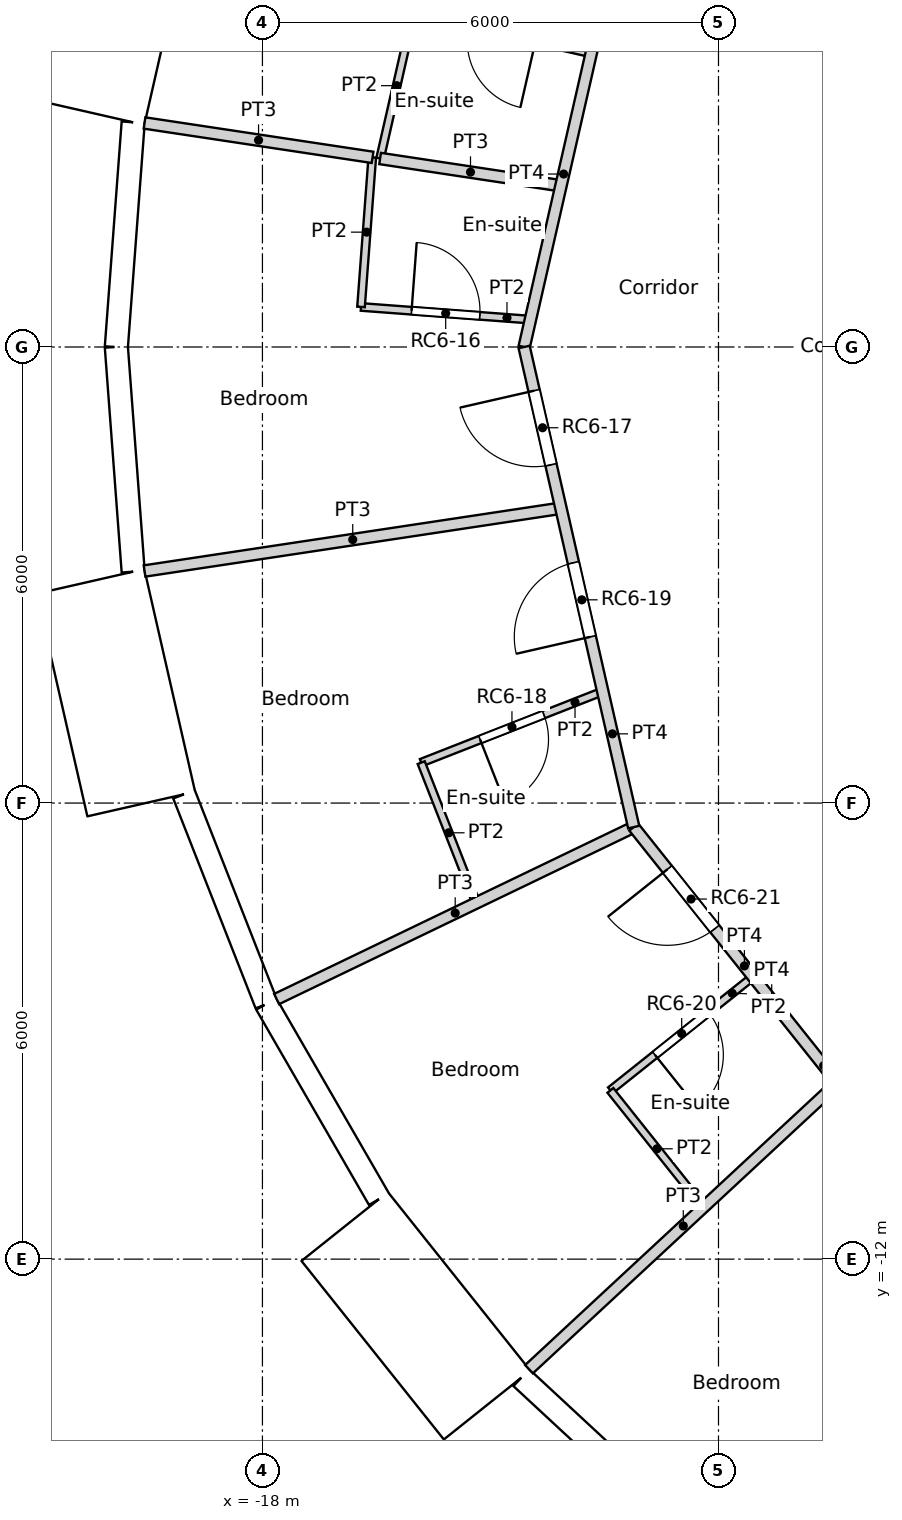
"""IFC4 building model, lengths in metres.
Left out: names, types, materials, properties, quantities, classifications, styles, units other than length and angle.
Written with IfcOpenShell. Run it as: python <this file> out.ifc"""

import sys

from ifc_helpers import new_model, si_unit, direction, frame, frame_2d, origin, origin_2d, place, context, subcontext, project, spatial, rectangle, circle, extrude, element, fill, save


model = new_model("IFC4")
c1 = context("Model", 3, precision=1e-05, world=origin(), true_north=direction((0.0, 1.0)))
c2 = subcontext(c1, "Body", "Model", "MODEL_VIEW")
j1 = project(units=[si_unit("LENGTHUNIT", "METRE"), si_unit("PLANEANGLEUNIT", "RADIAN")], contexts=[c1])
p1 = place(None, origin())
s1 = spatial("IfcSite", under=j1, at=p1, CompositionType="ELEMENT")
p2 = place(p1, origin())
s2 = spatial("IfcBuilding", under=s1, at=p2, CompositionType="ELEMENT")
p3 = place(p2, frame((0.0, 0.0, 283.8)))
s3 = spatial("IfcBuildingStorey", under=s2, at=p3, CompositionType="ELEMENT", Elevation=283.8)
for number, where, z_axis, x_axis in (
    (1, (-18.612, 2.805, 0.0), (0.0, 0.0, 1.0), (1.0, 0.0, 0.0)),
    (2, (-18.612, -2.805, 0.0), (0.0, 0.0, 1.0), (1.0, 0.0, 0.0)),
    (3, (-16.958, -8.167, 0.0), (0.0, 0.0, 1.0), (1.0, 0.0, 0.0)),
    (4, (-13.798, -12.802, 0.0), (0.0, 0.0, 1.0), (1.0, 0.0, 0.0)),
):
    element("IfcColumn", number, at=place(p3, frame(where, z_axis=z_axis, x_axis=x_axis)), inside=s3, PredefinedType="COLUMN", context=c2, shape_type="SweptSolid", body=[
        extrude(circle(Radius=0.45, at=origin_2d()), origin(), (0.0, 0.0, 1.0), 3.6),
    ])
p4 = place(p3, frame((-19.595, 6.011, -0.35), z_axis=(0.0, 0.0, 1.0), x_axis=(-0.222570682856, -0.974916555985, 0.0)))
e5 = element("IfcWall", 5, at=p4, inside=s3, PredefinedType="ELEMENTEDWALL", context=c2, shape_type="SweptSolid", body=[
    extrude(rectangle(XDim=3.0, YDim=1.45, at=frame_2d((1.5, 0.0))), origin(), (0.0, 0.0, 1.0), 3.6),
])
p5 = place(p4, frame((1.5, 0.0, 1.9)))
e6 = element("IfcOpeningElement", 6, at=p5, cuts=e5, PredefinedType="OPENING", context=c2, shape_type="SweptSolid", body=[
    extrude(circle(Radius=0.9, at=origin_2d()), frame((0.0, 0.735, 0.0), z_axis=(0.0, -1.0, 0.0), x_axis=(1.0, 0.0, 0.0)), (0.0, 0.0, 1.0), 1.47),
])
p6 = place(p3, frame((-19.7, 2.954, 0.0), z_axis=(0.0, 0.0, 1.0), x_axis=(-0.074755115547, -0.997201921729, 0.0)))
e7 = element("IfcWall", 7, at=p6, inside=s3, PredefinedType="SOLIDWALL", context=c2, shape_type="SweptSolid", body=[
    extrude(rectangle(XDim=2.962, YDim=0.3, at=frame_2d((1.481, 0.0))), origin(), (0.0, 0.0, 1.0), 3.25),
])
p7 = place(p6, frame((1.481, 0.0, 1.55)))
e8 = element("IfcOpeningElement", 8, at=p7, cuts=e7, PredefinedType="OPENING", context=c2, shape_type="SweptSolid", body=[
    extrude(circle(Radius=0.9, at=origin_2d()), frame((0.0, 0.16, 0.0), z_axis=(0.0, -1.0, 0.0), x_axis=(1.0, 0.0, 0.0)), (0.0, 0.0, 1.0), 0.32),
])
p8 = place(p3, frame((-19.922, 0.0, 0.0), z_axis=(0.0, 0.0, 1.0), x_axis=(0.074755115547, -0.997201921729, 0.0)))
e9 = element("IfcWall", 9, at=p8, inside=s3, PredefinedType="SOLIDWALL", context=c2, shape_type="SweptSolid", body=[
    extrude(rectangle(XDim=2.962, YDim=0.3, at=frame_2d((1.481, 0.0))), origin(), (0.0, 0.0, 1.0), 3.25),
])
p9 = place(p8, frame((1.481, 0.0, 1.55)))
e10 = element("IfcOpeningElement", 10, at=p9, cuts=e9, PredefinedType="OPENING", context=c2, shape_type="SweptSolid", body=[
    extrude(circle(Radius=0.9, at=origin_2d()), frame((0.0, 0.16, 0.0), z_axis=(0.0, -1.0, 0.0), x_axis=(1.0, 0.0, 0.0)), (0.0, 0.0, 1.0), 0.32),
])
p10 = place(p3, frame((-20.262, -3.086, -0.35), z_axis=(0.0, 0.0, 1.0), x_axis=(0.222570682856, -0.974916555985, 0.0)))
e11 = element("IfcWall", 11, at=p10, inside=s3, PredefinedType="ELEMENTEDWALL", context=c2, shape_type="SweptSolid", body=[
    extrude(rectangle(XDim=3.0, YDim=1.45, at=frame_2d((1.5, 0.0))), origin(), (0.0, 0.0, 1.0), 3.6),
])
p11 = place(p10, frame((1.5, 0.0, 1.9)))
e12 = element("IfcOpeningElement", 12, at=p11, cuts=e11, PredefinedType="OPENING", context=c2, shape_type="SweptSolid", body=[
    extrude(circle(Radius=0.9, at=origin_2d()), frame((0.0, 0.735, 0.0), z_axis=(0.0, -1.0, 0.0), x_axis=(1.0, 0.0, 0.0)), (0.0, 0.0, 1.0), 1.47),
])
p12 = place(p3, frame((-19.031, -5.886, 0.0), z_axis=(0.0, 0.0, 1.0), x_axis=(0.365343821297, -0.930872650925, 0.0)))
e13 = element("IfcWall", 13, at=p12, inside=s3, PredefinedType="SOLIDWALL", context=c2, shape_type="SweptSolid", body=[
    extrude(rectangle(XDim=2.962, YDim=0.3, at=frame_2d((1.481, 0.0))), origin(), (0.0, 0.0, 1.0), 3.25),
])
p13 = place(p12, frame((1.481, 0.0, 1.55)))
e14 = element("IfcOpeningElement", 14, at=p13, cuts=e13, PredefinedType="OPENING", context=c2, shape_type="SweptSolid", body=[
    extrude(circle(Radius=0.9, at=origin_2d()), frame((0.0, 0.16, 0.0), z_axis=(0.0, -1.0, 0.0), x_axis=(1.0, 0.0, 0.0)), (0.0, 0.0, 1.0), 0.32),
])
p14 = place(p3, frame((-17.949, -8.644, 0.0), z_axis=(0.0, 0.0, 1.0), x_axis=(0.500012570604, -0.866018146021, 0.0)))
e15 = element("IfcWall", 15, at=p14, inside=s3, PredefinedType="SOLIDWALL", context=c2, shape_type="SweptSolid", body=[
    extrude(rectangle(XDim=2.962, YDim=0.3, at=frame_2d((1.481, 0.0))), origin(), (0.0, 0.0, 1.0), 3.25),
])
p15 = place(p14, frame((1.481, 0.0, 1.55)))
e16 = element("IfcOpeningElement", 16, at=p15, cuts=e15, PredefinedType="OPENING", context=c2, shape_type="SweptSolid", body=[
    extrude(circle(Radius=0.9, at=origin_2d()), frame((0.0, 0.16, 0.0), z_axis=(0.0, -1.0, 0.0), x_axis=(1.0, 0.0, 0.0)), (0.0, 0.0, 1.0), 0.32),
])
p16 = place(p3, frame((-16.917, -11.572, -0.35), z_axis=(0.0, 0.0, 1.0), x_axis=(0.623523286312, -0.781804778335, 0.0)))
e17 = element("IfcWall", 17, at=p16, inside=s3, PredefinedType="ELEMENTEDWALL", context=c2, shape_type="SweptSolid", body=[
    extrude(rectangle(XDim=3.0, YDim=1.45, at=frame_2d((1.5, 0.0))), origin(), (0.0, 0.0, 1.0), 3.6),
])
p17 = place(p16, frame((1.5, 0.0, 1.9)))
e18 = element("IfcOpeningElement", 18, at=p17, cuts=e17, PredefinedType="OPENING", context=c2, shape_type="SweptSolid", body=[
    extrude(circle(Radius=0.9, at=origin_2d()), frame((0.0, 0.735, 0.0), z_axis=(0.0, -1.0, 0.0), x_axis=(1.0, 0.0, 0.0)), (0.0, 0.0, 1.0), 1.47),
])
p18 = place(p3, frame((-14.593, -13.561, 0.0), z_axis=(0.0, 0.0, 1.0), x_axis=(0.733028283666, -0.680198158882, 0.0)))
e19 = element("IfcWall", 19, at=p18, inside=s3, PredefinedType="SOLIDWALL", context=c2, shape_type="SweptSolid", body=[
    extrude(rectangle(XDim=2.962, YDim=0.3, at=frame_2d((1.481, 0.0))), origin(), (0.0, 0.0, 1.0), 3.25),
])
p19 = place(p18, frame((1.481, 0.0, 1.55)))
e20 = element("IfcOpeningElement", 20, at=p19, cuts=e19, PredefinedType="OPENING", context=c2, shape_type="SweptSolid", body=[
    extrude(circle(Radius=0.9, at=origin_2d()), frame((0.0, 0.16, 0.0), z_axis=(0.0, -1.0, 0.0), x_axis=(1.0, 0.0, 0.0)), (0.0, 0.0, 1.0), 0.32),
])
p20 = place(p3, frame((-11.3, -8.596, 0.0), z_axis=(0.0, 0.0, 1.0), x_axis=(0.623390921228, -0.781910326911, 0.0)))
e21 = element("IfcWall", 21, at=p20, inside=s3, PredefinedType="PARTITIONING", context=c2, shape_type="SweptSolid", body=[
    extrude(rectangle(XDim=3.564, YDim=0.15, at=frame_2d((1.782, 0.0))), origin(), (0.0, 0.0, 1.0), 3.25),
])
p21 = place(p20, frame((2.244, 0.0, 0.0)))
e22 = element("IfcOpeningElement", 22, at=p21, cuts=e21, PredefinedType="OPENING", context=c2, shape_type="SweptSolid", body=[
    extrude(rectangle(XDim=1.0, YDim=2.1, at=frame_2d((0.5, 1.05))), frame((0.0, 0.075, 0.0), z_axis=(0.0, -1.0, 0.0), x_axis=(1.0, 0.0, 0.0)), (0.0, 0.0, 1.0), 0.15),
])
p22 = place(p3, frame((-11.3, -8.596, 0.0), z_axis=(0.0, 0.0, 1.0), x_axis=(0.0, 1.0, 0.0)))
e23 = element("IfcWall", 23, at=p22, inside=s3, PredefinedType="PARTITIONING", context=c2, shape_type="SweptSolid", body=[
    extrude(rectangle(XDim=0.009, YDim=0.15, at=frame_2d((0.005, 0.0))), origin(), (0.0, 0.0, 1.0), 3.25),
])
p23 = place(p3, frame((-14.557, 0.0, 0.0), z_axis=(0.0, 0.0, 1.0), x_axis=(0.222533159771, 0.974925121639, 0.0)))
e24 = element("IfcWall", 24, at=p23, inside=s3, PredefinedType="PARTITIONING", context=c2, shape_type="SweptSolid", body=[
    extrude(rectangle(XDim=6.478, YDim=0.15, at=frame_2d((3.239, 0.0))), origin(), (0.0, 0.0, 1.0), 3.25),
])
p24 = place(p23, frame((4.718, 0.0, 0.0)))
e25 = element("IfcOpeningElement", 25, at=p24, cuts=e24, PredefinedType="OPENING", context=c2, shape_type="SweptSolid", body=[
    extrude(rectangle(XDim=1.0, YDim=2.1, at=frame_2d((0.5, 1.05))), frame((0.0, 0.075, 0.0), z_axis=(0.0, -1.0, 0.0), x_axis=(1.0, 0.0, 0.0)), (0.0, 0.0, 1.0), 0.15),
])
p25 = place(p3, frame((-14.557, 0.0, 0.0), z_axis=(0.0, 0.0, 1.0), x_axis=(0.222489165471, -0.974935162587, 0.0)))
e26 = element("IfcWall", 26, at=p25, inside=s3, PredefinedType="PARTITIONING", context=c2, shape_type="SweptSolid", body=[
    extrude(rectangle(XDim=6.479, YDim=0.15, at=frame_2d((3.239, 0.0))), origin(), (0.0, 0.0, 1.0), 3.25),
])
p26 = place(p25, frame((0.59, 0.0, 0.0)))
e27 = element("IfcOpeningElement", 27, at=p26, cuts=e26, PredefinedType="OPENING", context=c2, shape_type="SweptSolid", body=[
    extrude(rectangle(XDim=1.0, YDim=2.1, at=frame_2d((0.5, 1.05))), frame((0.0, 0.075, 0.0), z_axis=(0.0, -1.0, 0.0), x_axis=(1.0, 0.0, 0.0)), (0.0, 0.0, 1.0), 0.15),
])
p27 = place(p25, frame((2.912, 0.0, 0.0)))
e28 = element("IfcOpeningElement", 28, at=p27, cuts=e26, PredefinedType="OPENING", context=c2, shape_type="SweptSolid", body=[
    extrude(rectangle(XDim=1.0, YDim=2.1, at=frame_2d((0.5, 1.05))), frame((0.0, 0.075, 0.0), z_axis=(0.0, -1.0, 0.0), x_axis=(1.0, 0.0, 0.0)), (0.0, 0.0, 1.0), 0.15),
])
p28 = place(p3, frame((-13.115, -6.316, 0.0), z_axis=(0.0, 0.0, 1.0), x_axis=(0.623303083673, -0.781980348784, 0.0)))
e29 = element("IfcWall", 29, at=p28, inside=s3, PredefinedType="PARTITIONING", context=c2, shape_type="SweptSolid", body=[
    extrude(rectangle(XDim=2.911, YDim=0.15, at=frame_2d((1.456, 0.0))), origin(), (0.0, 0.0, 1.0), 3.25),
])
p29 = place(p28, frame((0.71, 0.0, 0.0)))
e30 = element("IfcOpeningElement", 30, at=p29, cuts=e29, PredefinedType="OPENING", context=c2, shape_type="SweptSolid", body=[
    extrude(rectangle(XDim=1.0, YDim=2.1, at=frame_2d((0.5, 1.05))), frame((0.0, 0.075, 0.0), z_axis=(0.0, -1.0, 0.0), x_axis=(1.0, 0.0, 0.0)), (0.0, 0.0, 1.0), 0.15),
])
p30 = place(p3, frame((-16.015, 4.396, 0.0), z_axis=(0.0, 0.0, 1.0), x_axis=(0.97493862442, -0.222473995368, 0.0)))
e31 = element("IfcWall", 31, at=p30, inside=s3, PredefinedType="PARTITIONING", context=c2, shape_type="SweptSolid", body=[
    extrude(rectangle(XDim=2.4, YDim=0.1, at=frame_2d((1.2, 0.0))), origin(), (0.0, 0.0, 1.0), 3.25),
])
p31 = place(p30, frame((0.75, 0.0, 0.0)))
e32 = element("IfcOpeningElement", 32, at=p31, cuts=e31, PredefinedType="OPENING", context=c2, shape_type="SweptSolid", body=[
    extrude(rectangle(XDim=0.9, YDim=2.04, at=frame_2d((0.45, 1.02))), frame((0.0, 0.05, 0.0), z_axis=(0.0, -1.0, 0.0), x_axis=(1.0, 0.0, 0.0)), (0.0, 0.0, 1.0), 0.1),
])
p32 = place(p3, frame((-16.452, 2.48, 0.0), z_axis=(0.0, 0.0, 1.0), x_axis=(0.22237276708, 0.974961718459, 0.0)))
e33 = element("IfcWall", 33, at=p32, inside=s3, PredefinedType="PARTITIONING", context=c2, shape_type="SweptSolid", body=[
    extrude(rectangle(XDim=1.965, YDim=0.1, at=frame_2d((0.983, 0.0))), origin(), (0.0, 0.0, 1.0), 3.25),
])
p33 = place(p3, frame((-19.551, 2.947, 0.0), z_axis=(0.0, 0.0, 1.0), x_axis=(0.988844081525, -0.14895429646, 0.0)))
e34 = element("IfcWall", 34, at=p33, inside=s3, PredefinedType="PARTITIONING", context=c2, shape_type="SweptSolid", body=[
    extrude(rectangle(XDim=3.034, YDim=0.15, at=frame_2d((1.517, 0.0))), origin(), (0.0, 0.0, 1.0), 3.25),
])
p34 = place(p3, frame((-16.452, 2.48, 0.0), z_axis=(0.0, 0.0, 1.0), x_axis=(0.988810951618, -0.149174065977, 0.0)))
e35 = element("IfcWall", 35, at=p34, inside=s3, PredefinedType="PARTITIONING", context=c2, shape_type="SweptSolid", body=[
    extrude(rectangle(XDim=2.406, YDim=0.15, at=frame_2d((1.203, 0.0))), origin(), (0.0, 0.0, 1.0), 3.25),
])
p35 = place(p3, frame((-16.703, 0.527, 0.0), z_axis=(0.0, 0.0, 1.0), x_axis=(0.07496524071, 0.99718614746, 0.0)))
e36 = element("IfcWall", 36, at=p35, inside=s3, PredefinedType="PARTITIONING", context=c2, shape_type="SweptSolid", body=[
    extrude(rectangle(XDim=1.974, YDim=0.1, at=frame_2d((0.987, 0.0))), origin(), (0.0, 0.0, 1.0), 3.25),
])
p36 = place(p3, frame((-16.703, 0.527, 0.0), z_axis=(0.0, 0.0, 1.0), x_axis=(0.997202365433, -0.074749196488, 0.0)))
e37 = element("IfcWall", 37, at=p36, inside=s3, PredefinedType="PARTITIONING", context=c2, shape_type="SweptSolid", body=[
    extrude(rectangle(XDim=2.234, YDim=0.1, at=frame_2d((1.117, 0.0))), origin(), (0.0, 0.0, 1.0), 3.25),
])
p37 = place(p36, frame((0.667, 0.0, 0.0)))
e38 = element("IfcOpeningElement", 38, at=p37, cuts=e37, PredefinedType="OPENING", context=c2, shape_type="SweptSolid", body=[
    extrude(rectangle(XDim=0.9, YDim=2.04, at=frame_2d((0.45, 1.02))), frame((0.0, 0.05, 0.0), z_axis=(0.0, -1.0, 0.0), x_axis=(1.0, 0.0, 0.0)), (0.0, 0.0, 1.0), 0.1),
])
p38 = place(p3, frame((-19.551, -2.947, 0.0), z_axis=(0.0, 0.0, 1.0), x_axis=(0.988824228734, 0.149086031099, 0.0)))
e39 = element("IfcWall", 39, at=p38, inside=s3, PredefinedType="PARTITIONING", context=c2, shape_type="SweptSolid", body=[
    extrude(rectangle(XDim=5.54, YDim=0.15, at=frame_2d((2.77, 0.0))), origin(), (0.0, 0.0, 1.0), 3.25),
])
p39 = place(p3, frame((-15.911, -5.468, 0.0), z_axis=(0.0, 0.0, 1.0), x_axis=(0.930898333543, 0.365278376867, 0.0)))
e40 = element("IfcWall", 40, at=p39, inside=s3, PredefinedType="PARTITIONING", context=c2, shape_type="SweptSolid", body=[
    extrude(rectangle(XDim=2.565, YDim=0.1, at=frame_2d((1.283, 0.0))), origin(), (0.0, 0.0, 1.0), 3.25),
])
p40 = place(p39, frame((0.832, 0.0, 0.0)))
e41 = element("IfcOpeningElement", 41, at=p40, cuts=e40, PredefinedType="OPENING", context=c2, shape_type="SweptSolid", body=[
    extrude(rectangle(XDim=0.9, YDim=2.04, at=frame_2d((0.45, 1.02))), frame((0.0, 0.05, 0.0), z_axis=(0.0, -1.0, 0.0), x_axis=(1.0, 0.0, 0.0)), (0.0, 0.0, 1.0), 0.1),
])
p41 = place(p3, frame((-15.911, -5.468, 0.0), z_axis=(0.0, 0.0, 1.0), x_axis=(0.36507706633, -0.930977301356, 0.0)))
e42 = element("IfcWall", 42, at=p41, inside=s3, PredefinedType="PARTITIONING", context=c2, shape_type="SweptSolid", body=[
    extrude(rectangle(XDim=1.983, YDim=0.1, at=frame_2d((0.991, 0.0))), origin(), (0.0, 0.0, 1.0), 3.25),
])
p42 = place(p3, frame((-17.813, -8.578, 0.0), z_axis=(0.0, 0.0, 1.0), x_axis=(0.901049790108, 0.433715662325, 0.0)))
e43 = element("IfcWall", 43, at=p42, inside=s3, PredefinedType="PARTITIONING", context=c2, shape_type="SweptSolid", body=[
    extrude(rectangle(XDim=5.214, YDim=0.15, at=frame_2d((2.607, 0.0))), origin(), (0.0, 0.0, 1.0), 3.25),
])
p43 = place(p3, frame((-13.422, -9.78, 0.0), z_axis=(0.0, 0.0, 1.0), x_axis=(0.781860394524, 0.623453545562, 0.0)))
e44 = element("IfcWall", 44, at=p43, inside=s3, PredefinedType="PARTITIONING", context=c2, shape_type="SweptSolid", body=[
    extrude(rectangle(XDim=2.4, YDim=0.1, at=frame_2d((1.2, 0.0))), origin(), (0.0, 0.0, 1.0), 3.25),
])
p44 = place(p43, frame((0.75, 0.0, 0.0)))
e45 = element("IfcOpeningElement", 45, at=p44, cuts=e44, PredefinedType="OPENING", context=c2, shape_type="SweptSolid", body=[
    extrude(rectangle(XDim=0.9, YDim=2.04, at=frame_2d((0.45, 1.02))), frame((0.0, 0.05, 0.0), z_axis=(0.0, -1.0, 0.0), x_axis=(1.0, 0.0, 0.0)), (0.0, 0.0, 1.0), 0.1),
])
p45 = place(p3, frame((-13.422, -9.78, 0.0), z_axis=(0.0, 0.0, 1.0), x_axis=(0.623330716607, -0.781958322249, 0.0)))
e46 = element("IfcWall", 46, at=p45, inside=s3, PredefinedType="PARTITIONING", context=c2, shape_type="SweptSolid", body=[
    extrude(rectangle(XDim=1.965, YDim=0.1, at=frame_2d((0.983, 0.0))), origin(), (0.0, 0.0, 1.0), 3.25),
])
p46 = place(p3, frame((-14.493, -13.448, 0.0), z_axis=(0.0, 0.0, 1.0), x_axis=(0.73295202722, 0.68028032883, 0.0)))
e47 = element("IfcWall", 47, at=p46, inside=s3, PredefinedType="PARTITIONING", context=c2, shape_type="SweptSolid", body=[
    extrude(rectangle(XDim=5.539, YDim=0.15, at=frame_2d((2.77, 0.0))), origin(), (0.0, 0.0, 1.0), 3.25),
])
p47 = place(p5, origin())
e48 = element("IfcWindow", 48, at=p47, inside=s3, PartitioningType="SINGLE_PANEL", PredefinedType="WINDOW", context=c2, shape_type="SweptSolid", body=[
    extrude(circle(Radius=0.9, at=origin_2d()), frame((0.0, 0.695, 0.0), z_axis=(0.0, -1.0, 0.0), x_axis=(1.0, 0.0, 0.0)), (0.0, 0.0, 1.0), 0.1),
])
fill(e6, e48)
p48 = place(p7, origin())
e49 = element("IfcWindow", 49, at=p48, inside=s3, PartitioningType="SINGLE_PANEL", PredefinedType="WINDOW", context=c2, shape_type="SweptSolid", body=[
    extrude(circle(Radius=0.9, at=origin_2d()), frame((0.0, 0.12, 0.0), z_axis=(0.0, -1.0, 0.0), x_axis=(1.0, 0.0, 0.0)), (0.0, 0.0, 1.0), 0.1),
])
fill(e8, e49)
p49 = place(p9, origin())
e50 = element("IfcWindow", 50, at=p49, inside=s3, PartitioningType="SINGLE_PANEL", PredefinedType="WINDOW", context=c2, shape_type="SweptSolid", body=[
    extrude(circle(Radius=0.9, at=origin_2d()), frame((0.0, 0.12, 0.0), z_axis=(0.0, -1.0, 0.0), x_axis=(1.0, 0.0, 0.0)), (0.0, 0.0, 1.0), 0.1),
])
fill(e10, e50)
p50 = place(p11, origin())
e51 = element("IfcWindow", 51, at=p50, inside=s3, PartitioningType="SINGLE_PANEL", PredefinedType="WINDOW", context=c2, shape_type="SweptSolid", body=[
    extrude(circle(Radius=0.9, at=origin_2d()), frame((0.0, 0.695, 0.0), z_axis=(0.0, -1.0, 0.0), x_axis=(1.0, 0.0, 0.0)), (0.0, 0.0, 1.0), 0.1),
])
fill(e12, e51)
p51 = place(p13, origin())
e52 = element("IfcWindow", 52, at=p51, inside=s3, PartitioningType="SINGLE_PANEL", PredefinedType="WINDOW", context=c2, shape_type="SweptSolid", body=[
    extrude(circle(Radius=0.9, at=origin_2d()), frame((0.0, 0.12, 0.0), z_axis=(0.0, -1.0, 0.0), x_axis=(1.0, 0.0, 0.0)), (0.0, 0.0, 1.0), 0.1),
])
fill(e14, e52)
p52 = place(p15, origin())
e53 = element("IfcWindow", 53, at=p52, inside=s3, PartitioningType="SINGLE_PANEL", PredefinedType="WINDOW", context=c2, shape_type="SweptSolid", body=[
    extrude(circle(Radius=0.9, at=origin_2d()), frame((0.0, 0.12, 0.0), z_axis=(0.0, -1.0, 0.0), x_axis=(1.0, 0.0, 0.0)), (0.0, 0.0, 1.0), 0.1),
])
fill(e16, e53)
p53 = place(p17, origin())
e54 = element("IfcWindow", 54, at=p53, inside=s3, PartitioningType="SINGLE_PANEL", PredefinedType="WINDOW", context=c2, shape_type="SweptSolid", body=[
    extrude(circle(Radius=0.9, at=origin_2d()), frame((0.0, 0.695, 0.0), z_axis=(0.0, -1.0, 0.0), x_axis=(1.0, 0.0, 0.0)), (0.0, 0.0, 1.0), 0.1),
])
fill(e18, e54)
p54 = place(p19, origin())
e55 = element("IfcWindow", 55, at=p54, inside=s3, PartitioningType="SINGLE_PANEL", PredefinedType="WINDOW", context=c2, shape_type="SweptSolid", body=[
    extrude(circle(Radius=0.9, at=origin_2d()), frame((0.0, 0.12, 0.0), z_axis=(0.0, -1.0, 0.0), x_axis=(1.0, 0.0, 0.0)), (0.0, 0.0, 1.0), 0.1),
])
fill(e20, e55)
p55 = place(p37, origin())
e56 = element("IfcDoor", 56, at=p55, inside=s3, OperationType="SINGLE_SWING_LEFT", PredefinedType="DOOR", context=c2, shape_type="SweptSolid", body=[
    extrude(rectangle(XDim=0.9, YDim=2.04, at=frame_2d((0.45, 1.02))), frame((0.0, 0.025, 0.0), z_axis=(0.0, -1.0, 0.0), x_axis=(1.0, 0.0, 0.0)), (0.0, 0.0, 1.0), 0.05),
])
fill(e38, e56)
p56 = place(p26, origin())
e57 = element("IfcDoor", 57, at=p56, inside=s3, OperationType="SINGLE_SWING_RIGHT", PredefinedType="DOOR", context=c2, shape_type="SweptSolid", body=[
    extrude(rectangle(XDim=1.0, YDim=2.1, at=frame_2d((0.5, 1.05))), frame((0.0, 0.025, 0.0), z_axis=(0.0, -1.0, 0.0), x_axis=(1.0, 0.0, 0.0)), (0.0, 0.0, 1.0), 0.05),
])
fill(e27, e57)
p57 = place(p40, origin())
e58 = element("IfcDoor", 58, at=p57, inside=s3, OperationType="SINGLE_SWING_RIGHT", PredefinedType="DOOR", context=c2, shape_type="SweptSolid", body=[
    extrude(rectangle(XDim=0.9, YDim=2.04, at=frame_2d((0.45, 1.02))), frame((0.0, 0.025, 0.0), z_axis=(0.0, -1.0, 0.0), x_axis=(1.0, 0.0, 0.0)), (0.0, 0.0, 1.0), 0.05),
])
fill(e41, e58)
p58 = place(p27, origin())
e59 = element("IfcDoor", 59, at=p58, inside=s3, OperationType="SINGLE_SWING_LEFT", PredefinedType="DOOR", context=c2, shape_type="SweptSolid", body=[
    extrude(rectangle(XDim=1.0, YDim=2.1, at=frame_2d((0.5, 1.05))), frame((0.0, 0.025, 0.0), z_axis=(0.0, -1.0, 0.0), x_axis=(1.0, 0.0, 0.0)), (0.0, 0.0, 1.0), 0.05),
])
fill(e28, e59)
p59 = place(p44, origin())
e60 = element("IfcDoor", 60, at=p59, inside=s3, OperationType="SINGLE_SWING_RIGHT", PredefinedType="DOOR", context=c2, shape_type="SweptSolid", body=[
    extrude(rectangle(XDim=0.9, YDim=2.04, at=frame_2d((0.45, 1.02))), frame((0.0, 0.025, 0.0), z_axis=(0.0, -1.0, 0.0), x_axis=(1.0, 0.0, 0.0)), (0.0, 0.0, 1.0), 0.05),
])
fill(e45, e60)
p60 = place(p29, origin())
e61 = element("IfcDoor", 61, at=p60, inside=s3, OperationType="SINGLE_SWING_RIGHT", PredefinedType="DOOR", context=c2, shape_type="SweptSolid", body=[
    extrude(rectangle(XDim=1.0, YDim=2.1, at=frame_2d((0.5, 1.05))), frame((0.0, 0.025, 0.0), z_axis=(0.0, -1.0, 0.0), x_axis=(1.0, 0.0, 0.0)), (0.0, 0.0, 1.0), 0.05),
])
fill(e30, e61)
save(model, sys.argv[1])
